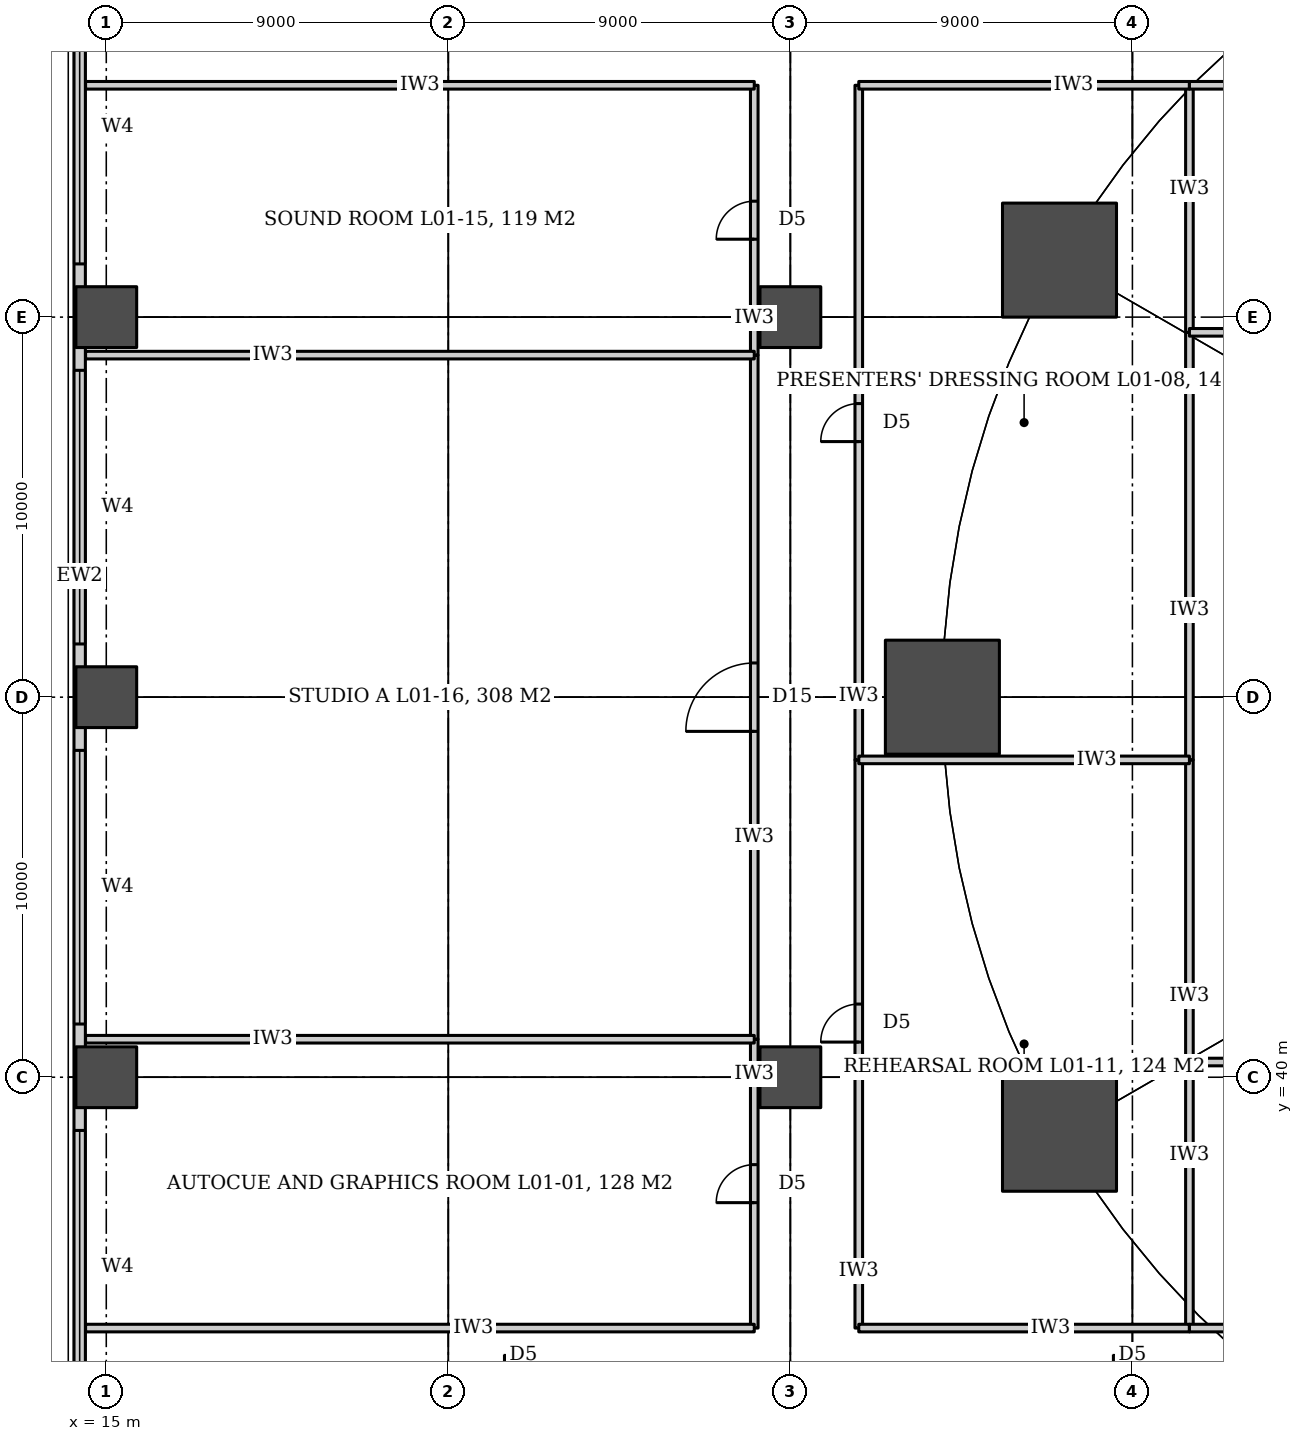
"""IFC4 building model, lengths in metres.
Left out: names, types, materials, properties, quantities, classifications, styles, units other than length and angle.
Written with IfcOpenShell. Run it as: python <this file> out.ifc"""

import sys

from ifc_helpers import new_model, si_unit, direction, frame, frame_2d, origin, origin_2d, place, context, subcontext, project, spatial, rectangle, circle, extrude, element, fill, save


model = new_model("IFC4")
c1 = context("Model", 3, precision=1e-05, world=origin(), true_north=direction((0.0, 1.0)))
c2 = subcontext(c1, "Body", "Model", "MODEL_VIEW")
j1 = project(units=[si_unit("LENGTHUNIT", "METRE"), si_unit("PLANEANGLEUNIT", "RADIAN")], contexts=[c1])
p1 = place(None, origin())
s1 = spatial("IfcSite", under=j1, at=p1, CompositionType="ELEMENT")
p2 = place(p1, origin())
s2 = spatial("IfcBuilding", under=s1, at=p2, CompositionType="ELEMENT")
p3 = place(p2, frame((0.0, 0.0, 6.0)))
s3 = spatial("IfcBuildingStorey", under=s2, at=p3, CompositionType="ELEMENT", Elevation=6.0)
for number, where, z_axis, x_axis in (
    (1, (15.0, 40.0, 0.0), (0.0, 0.0, 1.0), (1.0, 0.0, 0.0)),
    (2, (33.0, 40.0, 0.0), (0.0, 0.0, 1.0), (1.0, 0.0, 0.0)),
    (3, (15.0, 50.0, 0.0), (0.0, 0.0, 1.0), (1.0, 0.0, 0.0)),
    (4, (15.0, 60.0, 0.0), (0.0, 0.0, 1.0), (1.0, 0.0, 0.0)),
    (5, (33.0, 60.0, 0.0), (0.0, 0.0, 1.0), (1.0, 0.0, 0.0)),
):
    element("IfcColumn", number, at=place(p3, frame(where, z_axis=z_axis, x_axis=x_axis)), inside=s3, PredefinedType="COLUMN", context=c2, shape_type="SweptSolid", body=[
        extrude(rectangle(XDim=1.6, YDim=1.6, at=origin_2d()), origin(), (0.0, 0.0, 1.0), 9.0),
    ])
for number, where, z_axis, x_axis in (
    (6, (40.081, 61.5, 0.0), (0.0, 0.0, 1.0), (1.0, 0.0, 0.0)),
    (7, (37.0, 50.0, 0.0), (0.0, 0.0, 1.0), (1.0, 0.0, 0.0)),
    (8, (40.081, 38.5, 0.0), (0.0, 0.0, 1.0), (1.0, 0.0, 0.0)),
):
    element("IfcColumn", number, at=place(p3, frame(where, z_axis=z_axis, x_axis=x_axis)), inside=s3, PredefinedType="COLUMN", context=c2, shape_type="SweptSolid", body=[
        extrude(circle(Radius=1.5, at=origin_2d()), origin(), (0.0, 0.0, 1.0), 9.0),
    ])
p4 = place(p3, frame((32.05, 33.4, 0.0), z_axis=(0.0, 0.0, 1.0), x_axis=(0.0, 1.0, 0.0)))
e9 = element("IfcWall", 9, at=p4, inside=s3, PredefinedType="PARTITIONING", context=c2, shape_type="SweptSolid", body=[
    extrude(rectangle(XDim=7.6, YDim=0.2, at=frame_2d((3.8, 0.0))), origin(), (0.0, 0.0, 1.0), 6.18),
])
p5 = place(p4, frame((3.3, 0.0, 0.0)))
e10 = element("IfcOpeningElement", 10, at=p5, cuts=e9, PredefinedType="OPENING", context=c2, shape_type="SweptSolid", body=[
    extrude(rectangle(XDim=1.0, YDim=2.1, at=frame_2d((0.5, 1.05))), frame((0.0, 0.11, 0.0), z_axis=(0.0, -1.0, 0.0), x_axis=(1.0, 0.0, 0.0)), (0.0, 0.0, 1.0), 0.22),
])
p6 = place(p3, frame((32.05, 41.0, 0.0), z_axis=(0.0, 0.0, 1.0), x_axis=(0.0, 1.0, 0.0)))
e11 = element("IfcWall", 11, at=p6, inside=s3, PredefinedType="PARTITIONING", context=c2, shape_type="SweptSolid", body=[
    extrude(rectangle(XDim=18.0, YDim=0.2, at=frame_2d((9.0, 0.0))), origin(), (0.0, 0.0, 1.0), 6.18),
])
p7 = place(p6, frame((8.1, 0.0, 0.0)))
e12 = element("IfcOpeningElement", 12, at=p7, cuts=e11, PredefinedType="OPENING", context=c2, shape_type="SweptSolid", body=[
    extrude(rectangle(XDim=1.8, YDim=2.7, at=frame_2d((0.9, 1.35))), frame((0.0, 0.11, 0.0), z_axis=(0.0, -1.0, 0.0), x_axis=(1.0, 0.0, 0.0)), (0.0, 0.0, 1.0), 0.22),
])
p8 = place(p3, frame((32.05, 59.0, 0.0), z_axis=(0.0, 0.0, 1.0), x_axis=(0.0, 1.0, 0.0)))
e13 = element("IfcWall", 13, at=p8, inside=s3, PredefinedType="PARTITIONING", context=c2, shape_type="SweptSolid", body=[
    extrude(rectangle(XDim=7.1, YDim=0.2, at=frame_2d((3.55, 0.0))), origin(), (0.0, 0.0, 1.0), 6.18),
])
p9 = place(p8, frame((3.05, 0.0, 0.0)))
e14 = element("IfcOpeningElement", 14, at=p9, cuts=e13, PredefinedType="OPENING", context=c2, shape_type="SweptSolid", body=[
    extrude(rectangle(XDim=1.0, YDim=2.1, at=frame_2d((0.5, 1.05))), frame((0.0, 0.11, 0.0), z_axis=(0.0, -1.0, 0.0), x_axis=(1.0, 0.0, 0.0)), (0.0, 0.0, 1.0), 0.22),
])
p10 = place(p3, frame((34.8, 33.4, 0.0), z_axis=(0.0, 0.0, 1.0), x_axis=(0.0, 1.0, 0.0)))
e15 = element("IfcWall", 15, at=p10, inside=s3, PredefinedType="PARTITIONING", context=c2, shape_type="SweptSolid", body=[
    extrude(rectangle(XDim=14.95, YDim=0.2, at=frame_2d((7.475, 0.0))), origin(), (0.0, 0.0, 1.0), 6.68),
])
p11 = place(p10, frame((7.525, 0.0, 0.0)))
e16 = element("IfcOpeningElement", 16, at=p11, cuts=e15, PredefinedType="OPENING", context=c2, shape_type="SweptSolid", body=[
    extrude(rectangle(XDim=1.0, YDim=2.1, at=frame_2d((0.5, 1.05))), frame((0.0, 0.11, 0.0), z_axis=(0.0, -1.0, 0.0), x_axis=(1.0, 0.0, 0.0)), (0.0, 0.0, 1.0), 0.22),
])
p12 = place(p3, frame((34.8, 48.35, 0.0), z_axis=(0.0, 0.0, 1.0), x_axis=(0.0, 1.0, 0.0)))
e17 = element("IfcWall", 17, at=p12, inside=s3, PredefinedType="PARTITIONING", context=c2, shape_type="SweptSolid", body=[
    extrude(rectangle(XDim=17.75, YDim=0.2, at=frame_2d((8.875, 0.0))), origin(), (0.0, 0.0, 1.0), 6.18),
])
p13 = place(p12, frame((8.375, 0.0, 0.0)))
e18 = element("IfcOpeningElement", 18, at=p13, cuts=e17, PredefinedType="OPENING", context=c2, shape_type="SweptSolid", body=[
    extrude(rectangle(XDim=1.0, YDim=2.1, at=frame_2d((0.5, 1.05))), frame((0.0, 0.11, 0.0), z_axis=(0.0, -1.0, 0.0), x_axis=(1.0, 0.0, 0.0)), (0.0, 0.0, 1.0), 0.22),
])
p14 = place(p3, frame((43.5, 33.4, 0.0), z_axis=(0.0, 0.0, 1.0), x_axis=(0.0, 1.0, 0.0)))
e19 = element("IfcWall", 19, at=p14, inside=s3, PredefinedType="PARTITIONING", context=c2, shape_type="SweptSolid", body=[
    extrude(rectangle(XDim=7.0, YDim=0.2, at=frame_2d((3.5, 0.0))), origin(), (0.0, 0.0, 1.0), 6.08),
])
p15 = place(p3, frame((43.5, 40.4, 0.0), z_axis=(0.0, 0.0, 1.0), x_axis=(0.0, 1.0, 0.0)))
e20 = element("IfcWall", 20, at=p15, inside=s3, PredefinedType="PARTITIONING", context=c2, shape_type="SweptSolid", body=[
    extrude(rectangle(XDim=7.95, YDim=0.2, at=frame_2d((3.975, 0.0))), origin(), (0.0, 0.0, 1.0), 6.08),
])
p16 = place(p3, frame((43.5, 48.35, 0.0), z_axis=(0.0, 0.0, 1.0), x_axis=(0.0, 1.0, 0.0)))
e21 = element("IfcWall", 21, at=p16, inside=s3, PredefinedType="PARTITIONING", context=c2, shape_type="SweptSolid", body=[
    extrude(rectangle(XDim=11.25, YDim=0.2, at=frame_2d((5.625, 0.0))), origin(), (0.0, 0.0, 1.0), 6.08),
])
p17 = place(p3, frame((43.5, 59.6, 0.0), z_axis=(0.0, 0.0, 1.0), x_axis=(0.0, 1.0, 0.0)))
e22 = element("IfcWall", 22, at=p17, inside=s3, PredefinedType="PARTITIONING", context=c2, shape_type="SweptSolid", body=[
    extrude(rectangle(XDim=6.5, YDim=0.2, at=frame_2d((3.25, 0.0))), origin(), (0.0, 0.0, 1.0), 6.08),
])
p18 = place(p3, frame((14.455, 33.4, 0.0), z_axis=(0.0, 0.0, 1.0), x_axis=(1.0, 0.0, 0.0)))
e23 = element("IfcWall", 23, at=p18, inside=s3, PredefinedType="PARTITIONING", context=c2, shape_type="SweptSolid", body=[
    extrude(rectangle(XDim=17.595, YDim=0.2, at=frame_2d((8.797, 0.0))), origin(), (0.0, 0.0, 1.0), 6.68),
])
p19 = place(p3, frame((34.8, 33.4, 0.0), z_axis=(0.0, 0.0, 1.0), x_axis=(1.0, 0.0, 0.0)))
e24 = element("IfcWall", 24, at=p19, inside=s3, PredefinedType="PARTITIONING", context=c2, shape_type="SweptSolid", body=[
    extrude(rectangle(XDim=8.7, YDim=0.2, at=frame_2d((4.35, 0.0))), origin(), (0.0, 0.0, 1.0), 6.68),
])
p20 = place(p3, frame((43.5, 33.4, 0.0), z_axis=(0.0, 0.0, 1.0), x_axis=(1.0, 0.0, 0.0)))
e25 = element("IfcWall", 25, at=p20, inside=s3, PredefinedType="PARTITIONING", context=c2, shape_type="SweptSolid", body=[
    extrude(rectangle(XDim=18.55, YDim=0.2, at=frame_2d((9.275, 0.0))), origin(), (0.0, 0.0, 1.0), 6.08),
])
p21 = place(p20, frame((8.775, 0.0, 0.0)))
e26 = element("IfcOpeningElement", 26, at=p21, cuts=e25, PredefinedType="OPENING", context=c2, shape_type="SweptSolid", body=[
    extrude(rectangle(XDim=1.0, YDim=2.1, at=frame_2d((0.5, 1.05))), frame((0.0, 0.11, 0.0), z_axis=(0.0, -1.0, 0.0), x_axis=(1.0, 0.0, 0.0)), (0.0, 0.0, 1.0), 0.22),
])
p22 = place(p3, frame((43.5, 40.4, 0.0), z_axis=(0.0, 0.0, 1.0), x_axis=(1.0, 0.0, 0.0)))
e27 = element("IfcWall", 27, at=p22, inside=s3, PredefinedType="PARTITIONING", context=c2, shape_type="SweptSolid", body=[
    extrude(rectangle(XDim=18.55, YDim=0.2, at=frame_2d((9.275, 0.0))), origin(), (0.0, 0.0, 1.0), 5.48),
])
p23 = place(p3, frame((14.455, 41.0, 0.0), z_axis=(0.0, 0.0, 1.0), x_axis=(1.0, 0.0, 0.0)))
e28 = element("IfcWall", 28, at=p23, inside=s3, PredefinedType="PARTITIONING", context=c2, shape_type="SweptSolid", body=[
    extrude(rectangle(XDim=17.595, YDim=0.2, at=frame_2d((8.797, 0.0))), origin(), (0.0, 0.0, 1.0), 6.68),
])
p24 = place(p3, frame((34.8, 48.35, 0.0), z_axis=(0.0, 0.0, 1.0), x_axis=(1.0, 0.0, 0.0)))
e29 = element("IfcWall", 29, at=p24, inside=s3, PredefinedType="PARTITIONING", context=c2, shape_type="SweptSolid", body=[
    extrude(rectangle(XDim=8.7, YDim=0.2, at=frame_2d((4.35, 0.0))), origin(), (0.0, 0.0, 1.0), 6.68),
])
p25 = place(p3, frame((14.455, 59.0, 0.0), z_axis=(0.0, 0.0, 1.0), x_axis=(1.0, 0.0, 0.0)))
e30 = element("IfcWall", 30, at=p25, inside=s3, PredefinedType="PARTITIONING", context=c2, shape_type="SweptSolid", body=[
    extrude(rectangle(XDim=17.595, YDim=0.2, at=frame_2d((8.797, 0.0))), origin(), (0.0, 0.0, 1.0), 6.68),
])
p26 = place(p3, frame((43.5, 59.6, 0.0), z_axis=(0.0, 0.0, 1.0), x_axis=(1.0, 0.0, 0.0)))
e31 = element("IfcWall", 31, at=p26, inside=s3, PredefinedType="PARTITIONING", context=c2, shape_type="SweptSolid", body=[
    extrude(rectangle(XDim=18.55, YDim=0.2, at=frame_2d((9.275, 0.0))), origin(), (0.0, 0.0, 1.0), 5.48),
])
p27 = place(p3, frame((14.455, 66.1, 0.0), z_axis=(0.0, 0.0, 1.0), x_axis=(1.0, 0.0, 0.0)))
e32 = element("IfcWall", 32, at=p27, inside=s3, PredefinedType="PARTITIONING", context=c2, shape_type="SweptSolid", body=[
    extrude(rectangle(XDim=17.595, YDim=0.2, at=frame_2d((8.797, 0.0))), origin(), (0.0, 0.0, 1.0), 6.68),
])
p28 = place(p3, frame((34.8, 66.1, 0.0), z_axis=(0.0, 0.0, 1.0), x_axis=(1.0, 0.0, 0.0)))
e33 = element("IfcWall", 33, at=p28, inside=s3, PredefinedType="PARTITIONING", context=c2, shape_type="SweptSolid", body=[
    extrude(rectangle(XDim=8.7, YDim=0.2, at=frame_2d((4.35, 0.0))), origin(), (0.0, 0.0, 1.0), 6.68),
])
p29 = place(p3, frame((43.5, 66.1, 0.0), z_axis=(0.0, 0.0, 1.0), x_axis=(1.0, 0.0, 0.0)))
e34 = element("IfcWall", 34, at=p29, inside=s3, PredefinedType="PARTITIONING", context=c2, shape_type="SweptSolid", body=[
    extrude(rectangle(XDim=18.55, YDim=0.2, at=frame_2d((9.275, 0.0))), origin(), (0.0, 0.0, 1.0), 6.08),
])
p30 = place(p29, frame((8.775, 0.0, 0.0)))
e35 = element("IfcOpeningElement", 35, at=p30, cuts=e34, PredefinedType="OPENING", context=c2, shape_type="SweptSolid", body=[
    extrude(rectangle(XDim=1.0, YDim=2.1, at=frame_2d((0.5, 1.05))), frame((0.0, 0.11, 0.0), z_axis=(0.0, -1.0, 0.0), x_axis=(1.0, 0.0, 0.0)), (0.0, 0.0, 1.0), 0.22),
])
p31 = place(p3, frame((14.3, 70.0, 0.0), z_axis=(0.0, 0.0, 1.0), x_axis=(0.0, -1.0, 0.0)))
e36 = element("IfcWall", 36, at=p31, inside=s3, PredefinedType="SOLIDWALL", context=c2, shape_type="SweptSolid", body=[
    extrude(rectangle(XDim=40.0, YDim=0.3, at=frame_2d((20.0, 0.0))), origin(), (0.0, 0.0, 1.0), 8.7),
])
p32 = place(p31, frame((31.4, 0.0, 6.6)))
e37 = element("IfcOpeningElement", 37, at=p32, cuts=e36, PredefinedType="OPENING", context=c2, shape_type="SweptSolid", body=[
    extrude(rectangle(XDim=7.2, YDim=1.2, at=frame_2d((3.6, 0.6))), frame((0.0, 0.16, 0.0), z_axis=(0.0, -1.0, 0.0), x_axis=(1.0, 0.0, 0.0)), (0.0, 0.0, 1.0), 0.32),
])
p33 = place(p31, frame((21.4, 0.0, 6.6)))
e38 = element("IfcOpeningElement", 38, at=p33, cuts=e36, PredefinedType="OPENING", context=c2, shape_type="SweptSolid", body=[
    extrude(rectangle(XDim=7.2, YDim=1.2, at=frame_2d((3.6, 0.6))), frame((0.0, 0.16, 0.0), z_axis=(0.0, -1.0, 0.0), x_axis=(1.0, 0.0, 0.0)), (0.0, 0.0, 1.0), 0.32),
])
p34 = place(p31, frame((11.4, 0.0, 6.6)))
e39 = element("IfcOpeningElement", 39, at=p34, cuts=e36, PredefinedType="OPENING", context=c2, shape_type="SweptSolid", body=[
    extrude(rectangle(XDim=7.2, YDim=1.2, at=frame_2d((3.6, 0.6))), frame((0.0, 0.16, 0.0), z_axis=(0.0, -1.0, 0.0), x_axis=(1.0, 0.0, 0.0)), (0.0, 0.0, 1.0), 0.32),
])
p35 = place(p31, frame((1.4, 0.0, 6.6)))
e40 = element("IfcOpeningElement", 40, at=p35, cuts=e36, PredefinedType="OPENING", context=c2, shape_type="SweptSolid", body=[
    extrude(rectangle(XDim=7.2, YDim=1.2, at=frame_2d((3.6, 0.6))), frame((0.0, 0.16, 0.0), z_axis=(0.0, -1.0, 0.0), x_axis=(1.0, 0.0, 0.0)), (0.0, 0.0, 1.0), 0.32),
])
p36 = place(p7, origin())
e41 = element("IfcDoor", 41, at=p36, inside=s3, OperationType="DOUBLE_DOOR_DOUBLE_SWING", PredefinedType="DOOR", context=c2, shape_type="SweptSolid", body=[
    extrude(rectangle(XDim=1.8, YDim=2.7, at=frame_2d((0.9, 1.35))), frame((0.0, 0.025, 0.0), z_axis=(0.0, -1.0, 0.0), x_axis=(1.0, 0.0, 0.0)), (0.0, 0.0, 1.0), 0.05),
])
fill(e12, e41)
p37 = place(p11, origin())
e42 = element("IfcDoor", 42, at=p37, inside=s3, OperationType="SINGLE_SWING_LEFT", PredefinedType="DOOR", context=c2, shape_type="SweptSolid", body=[
    extrude(rectangle(XDim=1.0, YDim=2.1, at=frame_2d((0.5, 1.05))), frame((0.0, 0.025, 0.0), z_axis=(0.0, -1.0, 0.0), x_axis=(1.0, 0.0, 0.0)), (0.0, 0.0, 1.0), 0.05),
])
fill(e16, e42)
p38 = place(p13, origin())
e43 = element("IfcDoor", 43, at=p38, inside=s3, OperationType="SINGLE_SWING_LEFT", PredefinedType="DOOR", context=c2, shape_type="SweptSolid", body=[
    extrude(rectangle(XDim=1.0, YDim=2.1, at=frame_2d((0.5, 1.05))), frame((0.0, 0.025, 0.0), z_axis=(0.0, -1.0, 0.0), x_axis=(1.0, 0.0, 0.0)), (0.0, 0.0, 1.0), 0.05),
])
fill(e18, e43)
p39 = place(p5, origin())
e44 = element("IfcDoor", 44, at=p39, inside=s3, OperationType="SINGLE_SWING_LEFT", PredefinedType="DOOR", context=c2, shape_type="SweptSolid", body=[
    extrude(rectangle(XDim=1.0, YDim=2.1, at=frame_2d((0.5, 1.05))), frame((0.0, 0.025, 0.0), z_axis=(0.0, -1.0, 0.0), x_axis=(1.0, 0.0, 0.0)), (0.0, 0.0, 1.0), 0.05),
])
fill(e10, e44)
p40 = place(p9, origin())
e45 = element("IfcDoor", 45, at=p40, inside=s3, OperationType="SINGLE_SWING_LEFT", PredefinedType="DOOR", context=c2, shape_type="SweptSolid", body=[
    extrude(rectangle(XDim=1.0, YDim=2.1, at=frame_2d((0.5, 1.05))), frame((0.0, 0.025, 0.0), z_axis=(0.0, -1.0, 0.0), x_axis=(1.0, 0.0, 0.0)), (0.0, 0.0, 1.0), 0.05),
])
fill(e14, e45)
p41 = place(p32, origin())
e46 = element("IfcWindow", 46, at=p41, inside=s3, PartitioningType="SINGLE_PANEL", PredefinedType="WINDOW", context=c2, shape_type="SweptSolid", body=[
    extrude(rectangle(XDim=7.2, YDim=1.2, at=frame_2d((3.6, 0.6))), frame((0.0, 0.03, 0.0), z_axis=(0.0, -1.0, 0.0), x_axis=(1.0, 0.0, 0.0)), (0.0, 0.0, 1.0), 0.06),
])
fill(e37, e46)
p42 = place(p33, origin())
e47 = element("IfcWindow", 47, at=p42, inside=s3, PartitioningType="SINGLE_PANEL", PredefinedType="WINDOW", context=c2, shape_type="SweptSolid", body=[
    extrude(rectangle(XDim=7.2, YDim=1.2, at=frame_2d((3.6, 0.6))), frame((0.0, 0.03, 0.0), z_axis=(0.0, -1.0, 0.0), x_axis=(1.0, 0.0, 0.0)), (0.0, 0.0, 1.0), 0.06),
])
fill(e38, e47)
p43 = place(p34, origin())
e48 = element("IfcWindow", 48, at=p43, inside=s3, PartitioningType="SINGLE_PANEL", PredefinedType="WINDOW", context=c2, shape_type="SweptSolid", body=[
    extrude(rectangle(XDim=7.2, YDim=1.2, at=frame_2d((3.6, 0.6))), frame((0.0, 0.03, 0.0), z_axis=(0.0, -1.0, 0.0), x_axis=(1.0, 0.0, 0.0)), (0.0, 0.0, 1.0), 0.06),
])
fill(e39, e48)
p44 = place(p35, origin())
e49 = element("IfcWindow", 49, at=p44, inside=s3, PartitioningType="SINGLE_PANEL", PredefinedType="WINDOW", context=c2, shape_type="SweptSolid", body=[
    extrude(rectangle(XDim=7.2, YDim=1.2, at=frame_2d((3.6, 0.6))), frame((0.0, 0.03, 0.0), z_axis=(0.0, -1.0, 0.0), x_axis=(1.0, 0.0, 0.0)), (0.0, 0.0, 1.0), 0.06),
])
fill(e40, e49)
save(model, sys.argv[1])
